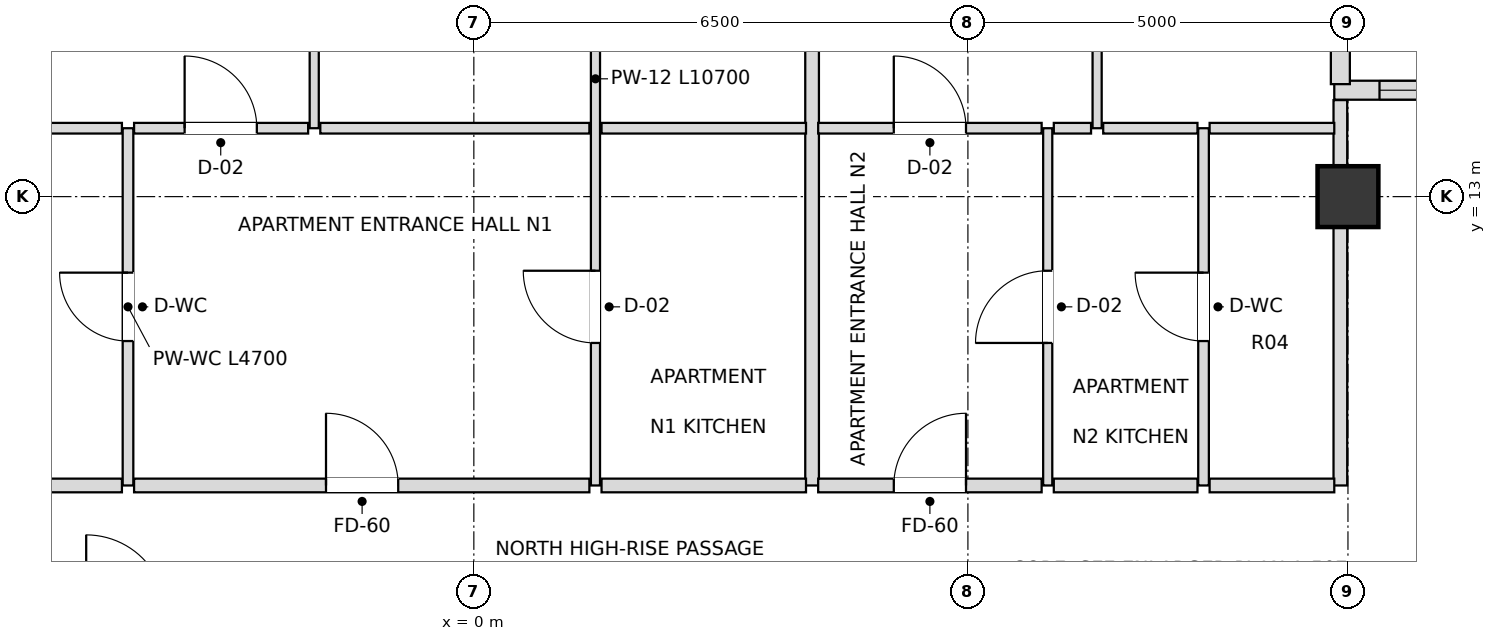
"""IFC4 building model, lengths in metres.
Left out: names, types, materials, properties, quantities, classifications, styles, units other than length and angle.
Written with IfcOpenShell. Run it as: python <this file> out.ifc"""

import sys

from ifc_helpers import new_model, si_unit, direction, frame, frame_2d, origin, origin_2d, place, context, subcontext, project, spatial, rectangle, extrude, element, fill, save


model = new_model("IFC4")
c1 = context("Model", 3, precision=1e-05, world=origin(), true_north=direction((0.0, 1.0)))
c2 = subcontext(c1, "Body", "Model", "MODEL_VIEW")
j1 = project(units=[si_unit("LENGTHUNIT", "METRE"), si_unit("PLANEANGLEUNIT", "RADIAN")], contexts=[c1])
p1 = place(None, origin())
s1 = spatial("IfcSite", under=j1, at=p1, CompositionType="ELEMENT")
p2 = place(p1, origin())
s2 = spatial("IfcBuilding", under=s1, at=p2, CompositionType="ELEMENT")
p3 = place(p2, frame((0.0, 0.0, 251.1)))
s3 = spatial("IfcBuildingStorey", under=s2, at=p3, CompositionType="ELEMENT", Elevation=251.1)
p4 = place(p3, frame((11.5, 13.0, 0.0), z_axis=(0.0, 0.0, 1.0), x_axis=(1.0, 0.0, 0.0)))
e1 = element("IfcColumn", 1, at=p4, inside=s3, PredefinedType="COLUMN", context=c2, shape_type="SweptSolid", body=[
    extrude(rectangle(XDim=0.8, YDim=0.8, at=origin_2d()), origin(), (0.0, 0.0, 1.0), 3.6),
])
p5 = place(p3, frame((16.98, 14.4, 0.0), z_axis=(0.0, 0.0, 1.0), x_axis=(-1.0, 0.0, 0.0)))
e2 = element("IfcWall", 2, at=p5, inside=s3, PredefinedType="SOLIDWALL", context=c2, shape_type="SweptSolid", body=[
    extrude(rectangle(XDim=5.66, YDim=0.25, at=frame_2d((2.83, 0.0))), origin(), (0.0, 0.0, 1.0), 2.748),
])
p6 = place(p5, frame((0.595, 0.0, 0.72)))
e3 = element("IfcOpeningElement", 3, at=p6, cuts=e2, PredefinedType="OPENING", context=c2, shape_type="SweptSolid", body=[
    extrude(rectangle(XDim=1.8, YDim=1.68, at=frame_2d((0.9, 0.84))), frame((0.0, 0.135, 0.0), z_axis=(0.0, -1.0, 0.0), x_axis=(1.0, 0.0, 0.0)), (0.0, 0.0, 1.0), 0.27),
])
p7 = place(p5, frame((3.265, 0.0, 0.72)))
e4 = element("IfcOpeningElement", 4, at=p7, cuts=e2, PredefinedType="OPENING", context=c2, shape_type="SweptSolid", body=[
    extrude(rectangle(XDim=1.8, YDim=1.68, at=frame_2d((0.9, 0.84))), frame((0.0, 0.135, 0.0), z_axis=(0.0, -1.0, 0.0), x_axis=(1.0, 0.0, 0.0)), (0.0, 0.0, 1.0), 0.27),
])
p8 = place(p3, frame((11.4, 14.48, 0.0), z_axis=(0.0, 0.0, 1.0), x_axis=(0.0, 1.0, 0.0)))
e5 = element("IfcWall", 5, at=p8, inside=s3, PredefinedType="SOLIDWALL", context=c2, shape_type="SweptSolid", body=[
    extrude(rectangle(XDim=5.34, YDim=0.25, at=frame_2d((2.67, 0.0))), origin(), (0.0, 0.0, 1.0), 2.748),
])
p9 = place(p8, frame((1.615, 0.0, 0.72)))
e6 = element("IfcOpeningElement", 6, at=p9, cuts=e5, PredefinedType="OPENING", context=c2, shape_type="SweptSolid", body=[
    extrude(rectangle(XDim=1.8, YDim=1.68, at=frame_2d((0.9, 0.84))), frame((0.0, 0.135, 0.0), z_axis=(0.0, -1.0, 0.0), x_axis=(1.0, 0.0, 0.0)), (0.0, 0.0, 1.0), 0.27),
])
p10 = place(p3, frame((-4.55, 9.2, 0.0), z_axis=(0.0, 0.0, 1.0), x_axis=(0.0, 1.0, 0.0)))
e7 = element("IfcWall", 7, at=p10, inside=s3, PredefinedType="PARTITIONING", context=c2, shape_type="SweptSolid", body=[
    extrude(rectangle(XDim=4.7, YDim=0.14, at=frame_2d((2.35, 0.0))), origin(), (0.0, 0.0, 1.0), 3.38),
])
p11 = place(p10, frame((1.9, 0.0, 0.0)))
e8 = element("IfcOpeningElement", 8, at=p11, cuts=e7, PredefinedType="OPENING", context=c2, shape_type="SweptSolid", body=[
    extrude(rectangle(XDim=0.9, YDim=2.1, at=frame_2d((0.45, 1.05))), frame((0.0, 0.08, 0.0), z_axis=(0.0, -1.0, 0.0), x_axis=(1.0, 0.0, 0.0)), (0.0, 0.0, 1.0), 0.16),
])
p12 = place(p3, frame((-2.1, 13.9, 0.0), z_axis=(0.0, 0.0, 1.0), x_axis=(0.0, 1.0, 0.0)))
e9 = element("IfcWall", 9, at=p12, inside=s3, PredefinedType="PARTITIONING", context=c2, shape_type="SweptSolid", body=[
    extrude(rectangle(XDim=6.0, YDim=0.12, at=frame_2d((3.0, 0.0))), origin(), (0.0, 0.0, 1.0), 3.018),
])
p13 = place(p12, frame((2.55, 0.0, 0.0)))
e10 = element("IfcOpeningElement", 10, at=p13, cuts=e9, PredefinedType="OPENING", context=c2, shape_type="SweptSolid", body=[
    extrude(rectangle(XDim=0.9, YDim=2.1, at=frame_2d((0.45, 1.05))), frame((0.0, 0.07, 0.0), z_axis=(0.0, -1.0, 0.0), x_axis=(1.0, 0.0, 0.0)), (0.0, 0.0, 1.0), 0.14),
])
p14 = place(p3, frame((1.6, 9.2, 0.0), z_axis=(0.0, 0.0, 1.0), x_axis=(0.0, 1.0, 0.0)))
e11 = element("IfcWall", 11, at=p14, inside=s3, PredefinedType="PARTITIONING", context=c2, shape_type="SweptSolid", body=[
    extrude(rectangle(XDim=10.7, YDim=0.12, at=frame_2d((5.35, 0.0))), origin(), (0.0, 0.0, 1.0), 3.018),
])
p15 = place(p14, frame((1.875, 0.0, 0.0)))
e12 = element("IfcOpeningElement", 12, at=p15, cuts=e11, PredefinedType="OPENING", context=c2, shape_type="SweptSolid", body=[
    extrude(rectangle(XDim=0.95, YDim=2.1, at=frame_2d((0.475, 1.05))), frame((0.0, 0.07, 0.0), z_axis=(0.0, -1.0, 0.0), x_axis=(1.0, 0.0, 0.0)), (0.0, 0.0, 1.0), 0.14),
])
p16 = place(p14, frame((7.25, 0.0, 0.0)))
e13 = element("IfcOpeningElement", 13, at=p16, cuts=e11, PredefinedType="OPENING", context=c2, shape_type="SweptSolid", body=[
    extrude(rectangle(XDim=0.9, YDim=2.1, at=frame_2d((0.45, 1.05))), frame((0.0, 0.07, 0.0), z_axis=(0.0, -1.0, 0.0), x_axis=(1.0, 0.0, 0.0)), (0.0, 0.0, 1.0), 0.14),
])
p17 = place(p3, frame((4.45, 9.2, 0.0), z_axis=(0.0, 0.0, 1.0), x_axis=(0.0, 1.0, 0.0)))
e14 = element("IfcWall", 14, at=p17, inside=s3, PredefinedType="PARTITIONING", context=c2, shape_type="SweptSolid", body=[
    extrude(rectangle(XDim=10.7, YDim=0.18, at=frame_2d((5.35, 0.0))), origin(), (0.0, 0.0, 1.0), 3.018),
])
p18 = place(p3, frame((7.55, 9.2, 0.0), z_axis=(0.0, 0.0, 1.0), x_axis=(0.0, 1.0, 0.0)))
e15 = element("IfcWall", 15, at=p18, inside=s3, PredefinedType="PARTITIONING", context=c2, shape_type="SweptSolid", body=[
    extrude(rectangle(XDim=4.7, YDim=0.12, at=frame_2d((2.35, 0.0))), origin(), (0.0, 0.0, 1.0), 2.826),
])
p19 = place(p18, frame((1.875, 0.0, 0.0)))
e16 = element("IfcOpeningElement", 16, at=p19, cuts=e15, PredefinedType="OPENING", context=c2, shape_type="SweptSolid", body=[
    extrude(rectangle(XDim=0.95, YDim=2.1, at=frame_2d((0.475, 1.05))), frame((0.0, 0.07, 0.0), z_axis=(0.0, -1.0, 0.0), x_axis=(1.0, 0.0, 0.0)), (0.0, 0.0, 1.0), 0.14),
])
p20 = place(p3, frame((8.2, 13.9, 0.0), z_axis=(0.0, 0.0, 1.0), x_axis=(0.0, 1.0, 0.0)))
e17 = element("IfcWall", 17, at=p20, inside=s3, PredefinedType="PARTITIONING", context=c2, shape_type="SweptSolid", body=[
    extrude(rectangle(XDim=6.0, YDim=0.12, at=frame_2d((3.0, 0.0))), origin(), (0.0, 0.0, 1.0), 3.38),
])
p21 = place(p20, frame((2.55, 0.0, 0.0)))
e18 = element("IfcOpeningElement", 18, at=p21, cuts=e17, PredefinedType="OPENING", context=c2, shape_type="SweptSolid", body=[
    extrude(rectangle(XDim=0.9, YDim=2.1, at=frame_2d((0.45, 1.05))), frame((0.0, 0.07, 0.0), z_axis=(0.0, -1.0, 0.0), x_axis=(1.0, 0.0, 0.0)), (0.0, 0.0, 1.0), 0.14),
])
p22 = place(p3, frame((9.6, 9.2, 0.0), z_axis=(0.0, 0.0, 1.0), x_axis=(0.0, 1.0, 0.0)))
e19 = element("IfcWall", 19, at=p22, inside=s3, PredefinedType="PARTITIONING", context=c2, shape_type="SweptSolid", body=[
    extrude(rectangle(XDim=4.7, YDim=0.14, at=frame_2d((2.35, 0.0))), origin(), (0.0, 0.0, 1.0), 2.826),
])
p23 = place(p22, frame((1.9, 0.0, 0.0)))
e20 = element("IfcOpeningElement", 20, at=p23, cuts=e19, PredefinedType="OPENING", context=c2, shape_type="SweptSolid", body=[
    extrude(rectangle(XDim=0.9, YDim=2.1, at=frame_2d((0.45, 1.05))), frame((0.0, 0.08, 0.0), z_axis=(0.0, -1.0, 0.0), x_axis=(1.0, 0.0, 0.0)), (0.0, 0.0, 1.0), 0.16),
])
p24 = place(p3, frame((11.4, 9.2, 0.0), z_axis=(0.0, 0.0, 1.0), x_axis=(0.0, 1.0, 0.0)))
e21 = element("IfcWall", 21, at=p24, inside=s3, PredefinedType="PARTITIONING", context=c2, shape_type="SweptSolid", body=[
    extrude(rectangle(XDim=5.07, YDim=0.18, at=frame_2d((2.535, 0.0))), origin(), (0.0, 0.0, 1.0), 2.748),
])
p25 = place(p3, frame((-6.42, 9.2, 0.0), z_axis=(0.0, 0.0, 1.0), x_axis=(1.0, 0.0, 0.0)))
e22 = element("IfcWall", 22, at=p25, inside=s3, PredefinedType="PARTITIONING", context=c2, shape_type="SweptSolid", body=[
    extrude(rectangle(XDim=1.79, YDim=0.18, at=frame_2d((0.895, 0.0))), origin(), (0.0, 0.0, 1.0), 3.38),
])
p26 = place(p3, frame((-4.47, 9.2, 0.0), z_axis=(0.0, 0.0, 1.0), x_axis=(1.0, 0.0, 0.0)))
e23 = element("IfcWall", 23, at=p26, inside=s3, PredefinedType="PARTITIONING", context=c2, shape_type="SweptSolid", body=[
    extrude(rectangle(XDim=5.99, YDim=0.18, at=frame_2d((2.995, 0.0))), origin(), (0.0, 0.0, 1.0), 3.38),
])
p27 = place(p26, frame((2.525, 0.0, 0.0)))
e24 = element("IfcOpeningElement", 24, at=p27, cuts=e23, PredefinedType="OPENING", context=c2, shape_type="SweptSolid", body=[
    extrude(rectangle(XDim=0.95, YDim=2.15, at=frame_2d((0.475, 1.075))), frame((0.0, 0.1, 0.0), z_axis=(0.0, -1.0, 0.0), x_axis=(1.0, 0.0, 0.0)), (0.0, 0.0, 1.0), 0.2),
])
p28 = place(p3, frame((1.68, 9.2, 0.0), z_axis=(0.0, 0.0, 1.0), x_axis=(1.0, 0.0, 0.0)))
e25 = element("IfcWall", 25, at=p28, inside=s3, PredefinedType="PARTITIONING", context=c2, shape_type="SweptSolid", body=[
    extrude(rectangle(XDim=2.69, YDim=0.18, at=frame_2d((1.345, 0.0))), origin(), (0.0, 0.0, 1.0), 3.38),
])
p29 = place(p3, frame((4.53, 9.2, 0.0), z_axis=(0.0, 0.0, 1.0), x_axis=(1.0, 0.0, 0.0)))
e26 = element("IfcWall", 26, at=p29, inside=s3, PredefinedType="PARTITIONING", context=c2, shape_type="SweptSolid", body=[
    extrude(rectangle(XDim=2.94, YDim=0.18, at=frame_2d((1.47, 0.0))), origin(), (0.0, 0.0, 1.0), 2.826),
])
p30 = place(p29, frame((0.995, 0.0, 0.0)))
e27 = element("IfcOpeningElement", 27, at=p30, cuts=e26, PredefinedType="OPENING", context=c2, shape_type="SweptSolid", body=[
    extrude(rectangle(XDim=0.95, YDim=2.15, at=frame_2d((0.475, 1.075))), frame((0.0, 0.1, 0.0), z_axis=(0.0, -1.0, 0.0), x_axis=(1.0, 0.0, 0.0)), (0.0, 0.0, 1.0), 0.2),
])
p31 = place(p3, frame((7.63, 9.2, 0.0), z_axis=(0.0, 0.0, 1.0), x_axis=(1.0, 0.0, 0.0)))
e28 = element("IfcWall", 28, at=p31, inside=s3, PredefinedType="PARTITIONING", context=c2, shape_type="SweptSolid", body=[
    extrude(rectangle(XDim=1.89, YDim=0.18, at=frame_2d((0.945, 0.0))), origin(), (0.0, 0.0, 1.0), 3.38),
])
p32 = place(p3, frame((9.68, 9.2, 0.0), z_axis=(0.0, 0.0, 1.0), x_axis=(1.0, 0.0, 0.0)))
e29 = element("IfcWall", 29, at=p32, inside=s3, PredefinedType="PARTITIONING", context=c2, shape_type="SweptSolid", body=[
    extrude(rectangle(XDim=1.64, YDim=0.18, at=frame_2d((0.82, 0.0))), origin(), (0.0, 0.0, 1.0), 3.38),
])
p33 = place(p3, frame((-6.42, 13.9, 0.0), z_axis=(0.0, 0.0, 1.0), x_axis=(1.0, 0.0, 0.0)))
e30 = element("IfcWall", 30, at=p33, inside=s3, PredefinedType="PARTITIONING", context=c2, shape_type="SweptSolid", body=[
    extrude(rectangle(XDim=1.79, YDim=0.14, at=frame_2d((0.895, 0.0))), origin(), (0.0, 0.0, 1.0), 3.38),
])
p34 = place(p3, frame((-4.47, 13.9, 0.0), z_axis=(0.0, 0.0, 1.0), x_axis=(1.0, 0.0, 0.0)))
e31 = element("IfcWall", 31, at=p34, inside=s3, PredefinedType="PARTITIONING", context=c2, shape_type="SweptSolid", body=[
    extrude(rectangle(XDim=2.29, YDim=0.14, at=frame_2d((1.145, 0.0))), origin(), (0.0, 0.0, 1.0), 3.38),
])
p35 = place(p34, frame((0.665, 0.0, 0.0)))
e32 = element("IfcOpeningElement", 32, at=p35, cuts=e31, PredefinedType="OPENING", context=c2, shape_type="SweptSolid", body=[
    extrude(rectangle(XDim=0.95, YDim=2.1, at=frame_2d((0.475, 1.05))), frame((0.0, 0.08, 0.0), z_axis=(0.0, -1.0, 0.0), x_axis=(1.0, 0.0, 0.0)), (0.0, 0.0, 1.0), 0.16),
])
p36 = place(p3, frame((-2.02, 13.9, 0.0), z_axis=(0.0, 0.0, 1.0), x_axis=(1.0, 0.0, 0.0)))
e33 = element("IfcWall", 33, at=p36, inside=s3, PredefinedType="PARTITIONING", context=c2, shape_type="SweptSolid", body=[
    extrude(rectangle(XDim=3.54, YDim=0.14, at=frame_2d((1.77, 0.0))), origin(), (0.0, 0.0, 1.0), 3.38),
])
p37 = place(p3, frame((1.68, 13.9, 0.0), z_axis=(0.0, 0.0, 1.0), x_axis=(1.0, 0.0, 0.0)))
e34 = element("IfcWall", 34, at=p37, inside=s3, PredefinedType="PARTITIONING", context=c2, shape_type="SweptSolid", body=[
    extrude(rectangle(XDim=2.69, YDim=0.14, at=frame_2d((1.345, 0.0))), origin(), (0.0, 0.0, 1.0), 3.38),
])
p38 = place(p3, frame((4.53, 13.9, 0.0), z_axis=(0.0, 0.0, 1.0), x_axis=(1.0, 0.0, 0.0)))
e35 = element("IfcWall", 35, at=p38, inside=s3, PredefinedType="PARTITIONING", context=c2, shape_type="SweptSolid", body=[
    extrude(rectangle(XDim=2.94, YDim=0.14, at=frame_2d((1.47, 0.0))), origin(), (0.0, 0.0, 1.0), 2.826),
])
p39 = place(p38, frame((0.995, 0.0, 0.0)))
e36 = element("IfcOpeningElement", 36, at=p39, cuts=e35, PredefinedType="OPENING", context=c2, shape_type="SweptSolid", body=[
    extrude(rectangle(XDim=0.95, YDim=2.1, at=frame_2d((0.475, 1.05))), frame((0.0, 0.08, 0.0), z_axis=(0.0, -1.0, 0.0), x_axis=(1.0, 0.0, 0.0)), (0.0, 0.0, 1.0), 0.16),
])
p40 = place(p3, frame((7.63, 13.9, 0.0), z_axis=(0.0, 0.0, 1.0), x_axis=(1.0, 0.0, 0.0)))
e37 = element("IfcWall", 37, at=p40, inside=s3, PredefinedType="PARTITIONING", context=c2, shape_type="SweptSolid", body=[
    extrude(rectangle(XDim=0.49, YDim=0.14, at=frame_2d((0.245, 0.0))), origin(), (0.0, 0.0, 1.0), 3.38),
])
p41 = place(p3, frame((8.28, 13.9, 0.0), z_axis=(0.0, 0.0, 1.0), x_axis=(1.0, 0.0, 0.0)))
e38 = element("IfcWall", 38, at=p41, inside=s3, PredefinedType="PARTITIONING", context=c2, shape_type="SweptSolid", body=[
    extrude(rectangle(XDim=1.24, YDim=0.14, at=frame_2d((0.62, 0.0))), origin(), (0.0, 0.0, 1.0), 3.38),
])
p42 = place(p3, frame((9.68, 13.9, 0.0), z_axis=(0.0, 0.0, 1.0), x_axis=(1.0, 0.0, 0.0)))
e39 = element("IfcWall", 39, at=p42, inside=s3, PredefinedType="PARTITIONING", context=c2, shape_type="SweptSolid", body=[
    extrude(rectangle(XDim=1.64, YDim=0.14, at=frame_2d((0.82, 0.0))), origin(), (0.0, 0.0, 1.0), 3.38),
])
p43 = place(p7, origin())
e40 = element("IfcWindow", 40, at=p43, inside=s3, PartitioningType="SINGLE_PANEL", PredefinedType="WINDOW", context=c2, shape_type="SweptSolid", body=[
    extrude(rectangle(XDim=1.8, YDim=1.68, at=frame_2d((0.9, 0.84))), frame((0.0, 0.03, 0.0), z_axis=(0.0, -1.0, 0.0), x_axis=(1.0, 0.0, 0.0)), (0.0, 0.0, 1.0), 0.06),
])
fill(e4, e40)
p44 = place(p11, origin())
e41 = element("IfcDoor", 41, at=p44, inside=s3, OperationType="SINGLE_SWING_RIGHT", PredefinedType="DOOR", context=c2, shape_type="SweptSolid", body=[
    extrude(rectangle(XDim=0.9, YDim=2.1, at=frame_2d((0.45, 1.05))), frame((0.0, 0.025, 0.0), z_axis=(0.0, -1.0, 0.0), x_axis=(1.0, 0.0, 0.0)), (0.0, 0.0, 1.0), 0.05),
])
fill(e8, e41)
p45 = place(p27, origin())
e42 = element("IfcDoor", 42, at=p45, inside=s3, OperationType="SINGLE_SWING_LEFT", PredefinedType="DOOR", context=c2, shape_type="SweptSolid", body=[
    extrude(rectangle(XDim=0.95, YDim=2.15, at=frame_2d((0.475, 1.075))), frame((0.0, 0.025, 0.0), z_axis=(0.0, -1.0, 0.0), x_axis=(1.0, 0.0, 0.0)), (0.0, 0.0, 1.0), 0.05),
])
fill(e24, e42)
p46 = place(p15, origin())
e43 = element("IfcDoor", 43, at=p46, inside=s3, OperationType="SINGLE_SWING_RIGHT", PredefinedType="DOOR", context=c2, shape_type="SweptSolid", body=[
    extrude(rectangle(XDim=0.95, YDim=2.1, at=frame_2d((0.475, 1.05))), frame((0.0, 0.025, 0.0), z_axis=(0.0, -1.0, 0.0), x_axis=(1.0, 0.0, 0.0)), (0.0, 0.0, 1.0), 0.05),
])
fill(e12, e43)
p47 = place(p35, origin())
e44 = element("IfcDoor", 44, at=p47, inside=s3, OperationType="SINGLE_SWING_LEFT", PredefinedType="DOOR", context=c2, shape_type="SweptSolid", body=[
    extrude(rectangle(XDim=0.95, YDim=2.1, at=frame_2d((0.475, 1.05))), frame((0.0, 0.025, 0.0), z_axis=(0.0, -1.0, 0.0), x_axis=(1.0, 0.0, 0.0)), (0.0, 0.0, 1.0), 0.05),
])
fill(e32, e44)
p48 = place(p30, origin())
e45 = element("IfcDoor", 45, at=p48, inside=s3, OperationType="SINGLE_SWING_RIGHT", PredefinedType="DOOR", context=c2, shape_type="SweptSolid", body=[
    extrude(rectangle(XDim=0.95, YDim=2.15, at=frame_2d((0.475, 1.075))), frame((0.0, 0.025, 0.0), z_axis=(0.0, -1.0, 0.0), x_axis=(1.0, 0.0, 0.0)), (0.0, 0.0, 1.0), 0.05),
])
fill(e27, e45)
p49 = place(p19, origin())
e46 = element("IfcDoor", 46, at=p49, inside=s3, OperationType="SINGLE_SWING_LEFT", PredefinedType="DOOR", context=c2, shape_type="SweptSolid", body=[
    extrude(rectangle(XDim=0.95, YDim=2.1, at=frame_2d((0.475, 1.05))), frame((0.0, 0.025, 0.0), z_axis=(0.0, -1.0, 0.0), x_axis=(1.0, 0.0, 0.0)), (0.0, 0.0, 1.0), 0.05),
])
fill(e16, e46)
p50 = place(p23, origin())
e47 = element("IfcDoor", 47, at=p50, inside=s3, OperationType="SINGLE_SWING_RIGHT", PredefinedType="DOOR", context=c2, shape_type="SweptSolid", body=[
    extrude(rectangle(XDim=0.9, YDim=2.1, at=frame_2d((0.45, 1.05))), frame((0.0, 0.025, 0.0), z_axis=(0.0, -1.0, 0.0), x_axis=(1.0, 0.0, 0.0)), (0.0, 0.0, 1.0), 0.05),
])
fill(e20, e47)
p51 = place(p39, origin())
e48 = element("IfcDoor", 48, at=p51, inside=s3, OperationType="SINGLE_SWING_LEFT", PredefinedType="DOOR", context=c2, shape_type="SweptSolid", body=[
    extrude(rectangle(XDim=0.95, YDim=2.1, at=frame_2d((0.475, 1.05))), frame((0.0, 0.025, 0.0), z_axis=(0.0, -1.0, 0.0), x_axis=(1.0, 0.0, 0.0)), (0.0, 0.0, 1.0), 0.05),
])
fill(e36, e48)
save(model, sys.argv[1])
